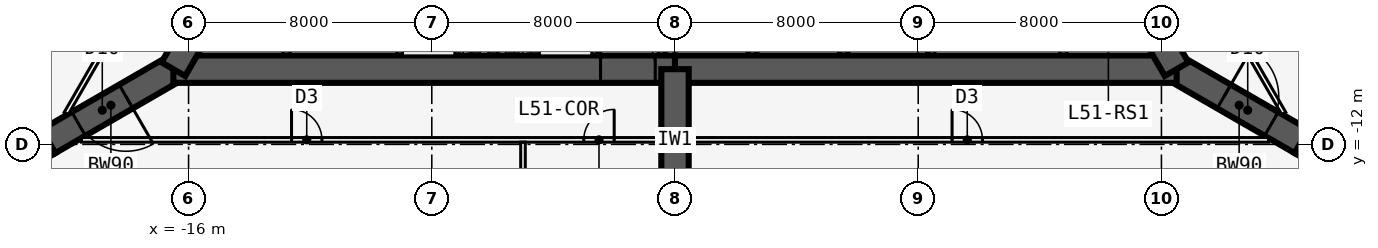
"""IFC4 building model, lengths in metres.
Left out: names, types, materials, properties, quantities, classifications, styles, units other than length and angle.
Written with IfcOpenShell. Run it as: python <this file> out.ifc"""

import sys

from ifc_helpers import new_model, si_unit, direction, frame, frame_2d, origin, place, context, subcontext, project, spatial, rectangle, extrude, element, fill, save


model = new_model("IFC4")
c1 = context("Model", 3, precision=1e-05, world=origin(), true_north=direction((0.0, 1.0)))
c2 = subcontext(c1, "Body", "Model", "MODEL_VIEW")
j1 = project(units=[si_unit("LENGTHUNIT", "METRE"), si_unit("PLANEANGLEUNIT", "RADIAN")], contexts=[c1])
p1 = place(None, origin())
s1 = spatial("IfcSite", under=j1, at=p1, CompositionType="ELEMENT")
p2 = place(p1, origin())
s2 = spatial("IfcBuilding", under=s1, at=p2, CompositionType="ELEMENT")
p3 = place(p2, frame((0.0, 0.0, 189.5)))
s3 = spatial("IfcBuildingStorey", under=s2, at=p3, CompositionType="ELEMENT", Elevation=189.5)
p4 = place(p3, frame((-16.5, -9.526, 0.0), z_axis=(0.0, 0.0, 1.0), x_axis=(1.0, 0.0, 0.0)))
e1 = element("IfcWall", 1, at=p4, inside=s3, PredefinedType="SHEAR", context=c2, shape_type="SweptSolid", body=[
    extrude(rectangle(XDim=16.5, YDim=0.9, at=frame_2d((8.25, 0.0))), origin(), (0.0, 0.0, 1.0), 6.4),
])
p5 = place(p4, frame((14.05, 0.0, 0.0)))
e2 = element("IfcOpeningElement", 2, at=p5, cuts=e1, PredefinedType="OPENING", context=c2, shape_type="SweptSolid", body=[
    extrude(rectangle(XDim=1.8, YDim=2.13, at=frame_2d((0.9, 1.065))), frame((0.0, 0.46, 0.0), z_axis=(0.0, -1.0, 0.0), x_axis=(1.0, 0.0, 0.0)), (0.0, 0.0, 1.0), 0.92),
])
p6 = place(p3, frame((0.0, -9.526, 0.0), z_axis=(0.0, 0.0, 1.0), x_axis=(1.0, 0.0, 0.0)))
e3 = element("IfcWall", 3, at=p6, inside=s3, PredefinedType="SHEAR", context=c2, shape_type="SweptSolid", body=[
    extrude(rectangle(XDim=16.5, YDim=0.9, at=frame_2d((8.25, 0.0))), origin(), (0.0, 0.0, 1.0), 6.4),
])
p7 = place(p3, frame((-9.05, -5.951, 0.0), z_axis=(0.0, 0.0, 1.0), x_axis=(0.0, -1.0, 0.0)))
e4 = element("IfcWall", 4, at=p7, inside=s3, PredefinedType="SOLIDWALL", context=c2, shape_type="SweptSolid", body=[
    extrude(rectangle(XDim=3.125, YDim=0.2, at=frame_2d((1.562, 0.0))), origin(), (0.0, 0.0, 1.0), 6.15),
])
p8 = place(p3, frame((-2.65, -5.951, 0.0), z_axis=(0.0, 0.0, 1.0), x_axis=(0.0, -1.0, 0.0)))
e5 = element("IfcWall", 5, at=p8, inside=s3, PredefinedType="SOLIDWALL", context=c2, shape_type="SweptSolid", body=[
    extrude(rectangle(XDim=3.125, YDim=0.2, at=frame_2d((1.562, 0.0))), origin(), (0.0, 0.0, 1.0), 6.15),
])
p9 = place(p8, frame((1.525, 0.0, 0.0)))
e6 = element("IfcOpeningElement", 6, at=p9, cuts=e5, PredefinedType="OPENING", context=c2, shape_type="SweptSolid", body=[
    extrude(rectangle(XDim=1.0, YDim=2.13, at=frame_2d((0.5, 1.065))), frame((0.0, 0.11, 0.0), z_axis=(0.0, -1.0, 0.0), x_axis=(1.0, 0.0, 0.0)), (0.0, 0.0, 1.0), 0.22),
])
for number, where, z_axis, x_axis in (
    (7, (-0.45, -5.951, 0.0), (0.0, 0.0, 1.0), (0.0, -1.0, 0.0)),
    (8, (2.55, -5.951, 0.0), (0.0, 0.0, 1.0), (0.0, -1.0, 0.0)),
    (9, (5.55, -5.951, 0.0), (0.0, 0.0, 1.0), (0.0, -1.0, 0.0)),
    (10, (8.45, -5.951, 0.0), (0.0, 0.0, 1.0), (0.0, -1.0, 0.0)),
):
    element("IfcWall", number, at=place(p3, frame(where, z_axis=z_axis, x_axis=x_axis)), inside=s3, PredefinedType="SOLIDWALL", context=c2, shape_type="SweptSolid", body=[
        extrude(rectangle(XDim=3.125, YDim=0.2, at=frame_2d((1.562, 0.0))), origin(), (0.0, 0.0, 1.0), 6.15),
    ])
p10 = place(p3, frame((16.5, -9.526, 0.0), z_axis=(0.0, 0.0, 1.0), x_axis=(-0.499996545922, 0.866027397988, 0.0)))
e11 = element("IfcWall", 11, at=p10, inside=s3, PredefinedType="SHEAR", context=c2, shape_type="SweptSolid", body=[
    extrude(rectangle(XDim=16.5, YDim=0.9, at=frame_2d((8.25, 0.0))), origin(), (0.0, 0.0, 1.0), 6.4),
])
p11 = place(p10, frame((14.15, 0.0, 0.0)))
e12 = element("IfcOpeningElement", 12, at=p11, cuts=e11, PredefinedType="OPENING", context=c2, shape_type="SweptSolid", body=[
    extrude(rectangle(XDim=1.8, YDim=2.13, at=frame_2d((0.9, 1.065))), frame((0.0, 0.46, 0.0), z_axis=(0.0, -1.0, 0.0), x_axis=(1.0, 0.0, 0.0)), (0.0, 0.0, 1.0), 0.92),
])
p12 = place(p10, frame((12.6, 0.0, 0.0)))
e13 = element("IfcOpeningElement", 13, at=p12, cuts=e11, PredefinedType="OPENING", context=c2, shape_type="SweptSolid", body=[
    extrude(rectangle(XDim=1.0, YDim=2.13, at=frame_2d((0.5, 1.065))), frame((0.0, 0.46, 0.0), z_axis=(0.0, -1.0, 0.0), x_axis=(1.0, 0.0, 0.0)), (0.0, 0.0, 1.0), 0.92),
])
p13 = place(p3, frame((-8.25, 4.763, 0.0), z_axis=(0.0, 0.0, 1.0), x_axis=(-0.499996545922, -0.866027397988, 0.0)))
e14 = element("IfcWall", 14, at=p13, inside=s3, PredefinedType="SHEAR", context=c2, shape_type="SweptSolid", body=[
    extrude(rectangle(XDim=16.5, YDim=0.9, at=frame_2d((8.25, 0.0))), origin(), (0.0, 0.0, 1.0), 6.4),
])
p14 = place(p3, frame((16.5, -9.526, 0.0), z_axis=(0.0, 0.0, 1.0), x_axis=(0.866031398331, -0.499989616998, 0.0)))
e15 = element("IfcWall", 15, at=p14, inside=s3, PredefinedType="SHEAR", context=c2, shape_type="SweptSolid", body=[
    extrude(rectangle(XDim=4.746, YDim=0.9, at=frame_2d((2.373, 0.0))), origin(), (0.0, 0.0, 1.0), 6.4),
])
p15 = place(p14, frame((1.8, 0.0, 0.0)))
e16 = element("IfcOpeningElement", 16, at=p15, cuts=e15, PredefinedType="OPENING", context=c2, shape_type="SweptSolid", body=[
    extrude(rectangle(XDim=1.8, YDim=2.13, at=frame_2d((0.9, 1.065))), frame((0.0, 0.46, 0.0), z_axis=(0.0, -1.0, 0.0), x_axis=(1.0, 0.0, 0.0)), (0.0, 0.0, 1.0), 0.92),
])
p16 = place(p3, frame((20.61, -11.899, 0.0), z_axis=(0.0, 0.0, 1.0), x_axis=(0.866009537788, -0.500027479704, 0.0)))
e17 = element("IfcWall", 17, at=p16, inside=s3, PredefinedType="SHEAR", context=c2, shape_type="SweptSolid", body=[
    extrude(rectangle(XDim=1.155, YDim=0.9, at=frame_2d((0.577, 0.0))), origin(), (0.0, 0.0, 1.0), 6.4),
])
p17 = place(p3, frame((-16.5, -9.526, 0.0), z_axis=(0.0, 0.0, 1.0), x_axis=(-0.866031398331, -0.499989616998, 0.0)))
e18 = element("IfcWall", 18, at=p17, inside=s3, PredefinedType="SHEAR", context=c2, shape_type="SweptSolid", body=[
    extrude(rectangle(XDim=4.746, YDim=0.9, at=frame_2d((2.373, 0.0))), origin(), (0.0, 0.0, 1.0), 6.4),
])
p18 = place(p17, frame((1.8, 0.0, 0.0)))
e19 = element("IfcOpeningElement", 19, at=p18, cuts=e18, PredefinedType="OPENING", context=c2, shape_type="SweptSolid", body=[
    extrude(rectangle(XDim=1.8, YDim=2.13, at=frame_2d((0.9, 1.065))), frame((0.0, 0.46, 0.0), z_axis=(0.0, -1.0, 0.0), x_axis=(1.0, 0.0, 0.0)), (0.0, 0.0, 1.0), 0.92),
])
p19 = place(p3, frame((-20.61, -11.899, 0.0), z_axis=(0.0, 0.0, 1.0), x_axis=(-0.866009537788, -0.500027479704, 0.0)))
e20 = element("IfcWall", 20, at=p19, inside=s3, PredefinedType="SHEAR", context=c2, shape_type="SweptSolid", body=[
    extrude(rectangle(XDim=1.155, YDim=0.9, at=frame_2d((0.577, 0.0))), origin(), (0.0, 0.0, 1.0), 6.4),
])
p20 = place(p3, frame((0.0, -9.526, 0.0), z_axis=(0.0, 0.0, 1.0), x_axis=(0.0, -1.0, 0.0)))
e21 = element("IfcWall", 21, at=p20, inside=s3, PredefinedType="SHEAR", context=c2, shape_type="SweptSolid", body=[
    extrude(rectangle(XDim=8.154, YDim=0.9, at=frame_2d((4.077, 0.0))), origin(), (0.0, 0.0, 1.0), 6.4),
])
p21 = place(p3, frame((-19.527, -11.851, 0.0), z_axis=(0.0, 0.0, 1.0), x_axis=(1.0, 0.0, 0.0)))
e22 = element("IfcWall", 22, at=p21, inside=s3, PredefinedType="PARTITIONING", context=c2, shape_type="SweptSolid", body=[
    extrude(rectangle(XDim=39.054, YDim=0.15, at=frame_2d((19.527, 0.0))), origin(), (0.0, 0.0, 1.0), 6.15),
])
p22 = place(p21, frame((6.914, 0.0, 0.0)))
e23 = element("IfcOpeningElement", 23, at=p22, cuts=e22, PredefinedType="OPENING", context=c2, shape_type="SweptSolid", body=[
    extrude(rectangle(XDim=1.0, YDim=2.13, at=frame_2d((0.5, 1.065))), frame((0.0, 0.085, 0.0), z_axis=(0.0, -1.0, 0.0), x_axis=(1.0, 0.0, 0.0)), (0.0, 0.0, 1.0), 0.17),
])
p23 = place(p21, frame((16.527, 0.0, 0.0)))
e24 = element("IfcOpeningElement", 24, at=p23, cuts=e22, PredefinedType="OPENING", context=c2, shape_type="SweptSolid", body=[
    extrude(rectangle(XDim=1.0, YDim=2.13, at=frame_2d((0.5, 1.065))), frame((0.0, 0.085, 0.0), z_axis=(0.0, -1.0, 0.0), x_axis=(1.0, 0.0, 0.0)), (0.0, 0.0, 1.0), 0.17),
])
p24 = place(p21, frame((28.64, 0.0, 0.0)))
e25 = element("IfcOpeningElement", 25, at=p24, cuts=e22, PredefinedType="OPENING", context=c2, shape_type="SweptSolid", body=[
    extrude(rectangle(XDim=1.0, YDim=2.13, at=frame_2d((0.5, 1.065))), frame((0.0, 0.085, 0.0), z_axis=(0.0, -1.0, 0.0), x_axis=(1.0, 0.0, 0.0)), (0.0, 0.0, 1.0), 0.17),
])
p25 = place(p3, frame((-5.0, -11.926, 0.0), z_axis=(0.0, 0.0, 1.0), x_axis=(0.0, -1.0, 0.0)))
e26 = element("IfcWall", 26, at=p25, inside=s3, PredefinedType="PARTITIONING", context=c2, shape_type="SweptSolid", body=[
    extrude(rectangle(XDim=8.923, YDim=0.15, at=frame_2d((4.461, 0.0))), origin(), (0.0, 0.0, 1.0), 4.75),
])
p26 = place(p3, frame((20.027, -10.985, 0.0), z_axis=(0.0, 0.0, 1.0), x_axis=(-0.500001677587, 0.866024435227, 0.0)))
e27 = element("IfcWall", 27, at=p26, inside=s3, PredefinedType="PARTITIONING", context=c2, shape_type="SweptSolid", body=[
    extrude(rectangle(XDim=39.054, YDim=0.15, at=frame_2d((19.527, 0.0))), origin(), (0.0, 0.0, 1.0), 6.15),
])
p27 = place(p26, frame((5.914, 0.0, 0.0)))
e28 = element("IfcOpeningElement", 28, at=p27, cuts=e27, PredefinedType="OPENING", context=c2, shape_type="SweptSolid", body=[
    extrude(rectangle(XDim=1.0, YDim=2.13, at=frame_2d((0.5, 1.065))), frame((0.0, 0.085, 0.0), z_axis=(0.0, -1.0, 0.0), x_axis=(1.0, 0.0, 0.0)), (0.0, 0.0, 1.0), 0.17),
])
p28 = place(p26, frame((15.527, 0.0, 0.0)))
e29 = element("IfcOpeningElement", 29, at=p28, cuts=e27, PredefinedType="OPENING", context=c2, shape_type="SweptSolid", body=[
    extrude(rectangle(XDim=1.0, YDim=2.13, at=frame_2d((0.5, 1.065))), frame((0.0, 0.085, 0.0), z_axis=(0.0, -1.0, 0.0), x_axis=(1.0, 0.0, 0.0)), (0.0, 0.0, 1.0), 0.17),
])
p29 = place(p26, frame((22.027, 0.0, 0.0)))
e30 = element("IfcOpeningElement", 30, at=p29, cuts=e27, PredefinedType="OPENING", context=c2, shape_type="SweptSolid", body=[
    extrude(rectangle(XDim=1.0, YDim=2.13, at=frame_2d((0.5, 1.065))), frame((0.0, 0.085, 0.0), z_axis=(0.0, -1.0, 0.0), x_axis=(1.0, 0.0, 0.0)), (0.0, 0.0, 1.0), 0.17),
])
p30 = place(p26, frame((31.64, 0.0, 0.0)))
e31 = element("IfcOpeningElement", 31, at=p30, cuts=e27, PredefinedType="OPENING", context=c2, shape_type="SweptSolid", body=[
    extrude(rectangle(XDim=1.0, YDim=2.13, at=frame_2d((0.5, 1.065))), frame((0.0, 0.085, 0.0), z_axis=(0.0, -1.0, 0.0), x_axis=(1.0, 0.0, 0.0)), (0.0, 0.0, 1.0), 0.17),
])
p31 = place(p3, frame((-0.5, 22.836, 0.0), z_axis=(0.0, 0.0, 1.0), x_axis=(-0.500001677587, -0.866024435227, 0.0)))
e32 = element("IfcWall", 32, at=p31, inside=s3, PredefinedType="PARTITIONING", context=c2, shape_type="SweptSolid", body=[
    extrude(rectangle(XDim=39.054, YDim=0.15, at=frame_2d((19.527, 0.0))), origin(), (0.0, 0.0, 1.0), 6.15),
])
p32 = place(p31, frame((7.914, 0.0, 0.0)))
e33 = element("IfcOpeningElement", 33, at=p32, cuts=e32, PredefinedType="OPENING", context=c2, shape_type="SweptSolid", body=[
    extrude(rectangle(XDim=1.0, YDim=2.13, at=frame_2d((0.5, 1.065))), frame((0.0, 0.085, 0.0), z_axis=(0.0, -1.0, 0.0), x_axis=(1.0, 0.0, 0.0)), (0.0, 0.0, 1.0), 0.17),
])
p33 = place(p31, frame((17.527, 0.0, 0.0)))
e34 = element("IfcOpeningElement", 34, at=p33, cuts=e32, PredefinedType="OPENING", context=c2, shape_type="SweptSolid", body=[
    extrude(rectangle(XDim=1.0, YDim=2.13, at=frame_2d((0.5, 1.065))), frame((0.0, 0.085, 0.0), z_axis=(0.0, -1.0, 0.0), x_axis=(1.0, 0.0, 0.0)), (0.0, 0.0, 1.0), 0.17),
])
p34 = place(p31, frame((28.64, 0.0, 0.0)))
e35 = element("IfcOpeningElement", 35, at=p34, cuts=e32, PredefinedType="OPENING", context=c2, shape_type="SweptSolid", body=[
    extrude(rectangle(XDim=1.0, YDim=2.13, at=frame_2d((0.5, 1.065))), frame((0.0, 0.085, 0.0), z_axis=(0.0, -1.0, 0.0), x_axis=(1.0, 0.0, 0.0)), (0.0, 0.0, 1.0), 0.17),
])
for number, where, z_axis, x_axis in (
    (36, (14.219, -6.476, 0.0), (0.0, 0.0, 1.0), (-0.5, -0.866, 0.0)),
    (37, (-12.719, -9.076, 0.0), (0.0, 0.0, 1.0), (-0.5, 0.866, 0.0)),
):
    element("IfcWall", number, at=place(p3, frame(where, z_axis=z_axis, x_axis=x_axis)), inside=s3, PredefinedType="SOLIDWALL", context=c2, shape_type="SweptSolid", body=[
        extrude(rectangle(XDim=3.002, YDim=0.2, at=frame_2d((1.501, 0.0))), origin(), (0.0, 0.0, 1.0), 6.15),
    ])
p35 = place(p22, origin())
e38 = element("IfcDoor", 38, at=p35, inside=s3, OperationType="SINGLE_SWING_LEFT", PredefinedType="DOOR", context=c2, shape_type="SweptSolid", body=[
    extrude(rectangle(XDim=1.0, YDim=2.13, at=frame_2d((0.5, 1.065))), frame((0.0, 0.025, 0.0), z_axis=(0.0, -1.0, 0.0), x_axis=(1.0, 0.0, 0.0)), (0.0, 0.0, 1.0), 0.05),
])
fill(e23, e38)
p36 = place(p23, origin())
e39 = element("IfcDoor", 39, at=p36, inside=s3, OperationType="SINGLE_SWING_RIGHT", PredefinedType="DOOR", context=c2, shape_type="SweptSolid", body=[
    extrude(rectangle(XDim=1.0, YDim=2.13, at=frame_2d((0.5, 1.065))), frame((0.0, 0.025, 0.0), z_axis=(0.0, -1.0, 0.0), x_axis=(1.0, 0.0, 0.0)), (0.0, 0.0, 1.0), 0.05),
])
fill(e24, e39)
p37 = place(p24, origin())
e40 = element("IfcDoor", 40, at=p37, inside=s3, OperationType="SINGLE_SWING_LEFT", PredefinedType="DOOR", context=c2, shape_type="SweptSolid", body=[
    extrude(rectangle(XDim=1.0, YDim=2.13, at=frame_2d((0.5, 1.065))), frame((0.0, 0.025, 0.0), z_axis=(0.0, -1.0, 0.0), x_axis=(1.0, 0.0, 0.0)), (0.0, 0.0, 1.0), 0.05),
])
fill(e25, e40)
p38 = place(p5, origin())
e41 = element("IfcDoor", 41, at=p38, inside=s3, OperationType="DOUBLE_DOOR_SINGLE_SWING", PredefinedType="DOOR", context=c2, shape_type="SweptSolid", body=[
    extrude(rectangle(XDim=1.8, YDim=2.13, at=frame_2d((0.9, 1.065))), frame((0.0, 0.025, 0.0), z_axis=(0.0, -1.0, 0.0), x_axis=(1.0, 0.0, 0.0)), (0.0, 0.0, 1.0), 0.05),
])
fill(e2, e41)
p39 = place(p15, origin())
e42 = element("IfcDoor", 42, at=p39, inside=s3, OperationType="DOUBLE_DOOR_DOUBLE_SWING", PredefinedType="DOOR", context=c2, shape_type="SweptSolid", body=[
    extrude(rectangle(XDim=1.8, YDim=2.13, at=frame_2d((0.9, 1.065))), frame((0.0, 0.025, 0.0), z_axis=(0.0, -1.0, 0.0), x_axis=(1.0, 0.0, 0.0)), (0.0, 0.0, 1.0), 0.05),
])
fill(e16, e42)
p40 = place(p18, origin())
e43 = element("IfcDoor", 43, at=p40, inside=s3, OperationType="DOUBLE_DOOR_DOUBLE_SWING", PredefinedType="DOOR", context=c2, shape_type="SweptSolid", body=[
    extrude(rectangle(XDim=1.8, YDim=2.13, at=frame_2d((0.9, 1.065))), frame((0.0, 0.025, 0.0), z_axis=(0.0, -1.0, 0.0), x_axis=(1.0, 0.0, 0.0)), (0.0, 0.0, 1.0), 0.05),
])
fill(e19, e43)
save(model, sys.argv[1])
